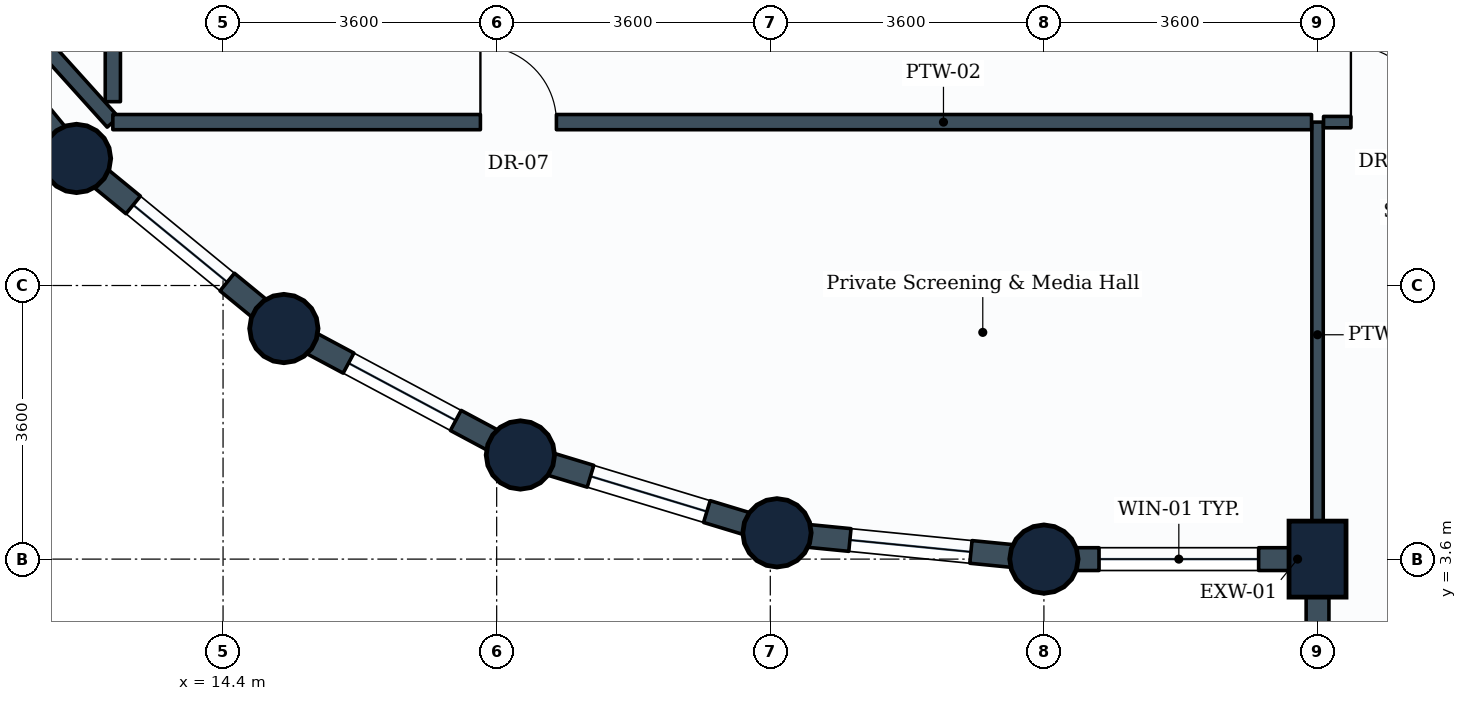
"""IFC4 building model, lengths in metres.
Left out: names, types, materials, properties, quantities, classifications, styles, units other than length and angle.
Written with IfcOpenShell. Run it as: python <this file> out.ifc"""

import sys

from ifc_helpers import new_model, si_unit, direction, frame, frame_2d, origin, origin_2d, place, context, subcontext, project, spatial, rectangle, circle, extrude, element, fill, save


model = new_model("IFC4")
c1 = context("Model", 3, precision=1e-05, world=origin(), true_north=direction((0.0, 1.0)))
c2 = subcontext(c1, "Body", "Model", "MODEL_VIEW")
j1 = project(units=[si_unit("LENGTHUNIT", "METRE"), si_unit("PLANEANGLEUNIT", "RADIAN")], contexts=[c1])
p1 = place(None, origin())
s1 = spatial("IfcSite", under=j1, at=p1, CompositionType="ELEMENT")
p2 = place(p1, origin())
s2 = spatial("IfcBuilding", under=s1, at=p2, CompositionType="ELEMENT")
p3 = place(p2, frame((0.0, 0.0, 139.0)))
s3 = spatial("IfcBuildingStorey", under=s2, at=p3, CompositionType="ELEMENT", Elevation=139.0)
for number, where, z_axis, x_axis in (
    (1, (12.472, 8.872, 0.0), (0.0, 0.0, 1.0), (1.0, 0.0, 0.0)),
    (2, (15.2, 6.634, 0.0), (0.0, 0.0, 1.0), (1.0, 0.0, 0.0)),
    (3, (18.312, 4.97, 0.0), (0.0, 0.0, 1.0), (1.0, 0.0, 0.0)),
    (4, (21.688, 3.946, 0.0), (0.0, 0.0, 1.0), (1.0, 0.0, 0.0)),
    (5, (25.2, 3.6, 0.0), (0.0, 0.0, 1.0), (1.0, 0.0, 0.0)),
):
    element("IfcColumn", number, at=place(p3, frame(where, z_axis=z_axis, x_axis=x_axis)), inside=s3, PredefinedType="COLUMN", context=c2, shape_type="SweptSolid", body=[
        extrude(circle(Radius=0.45, at=origin_2d()), origin(), (0.0, 0.0, 1.0), 3.8),
    ])
p4 = place(p3, frame((28.8, 3.6, 0.0), z_axis=(0.0, 0.0, 1.0), x_axis=(1.0, 0.0, 0.0)))
e6 = element("IfcColumn", 6, at=p4, inside=s3, PredefinedType="COLUMN", context=c2, shape_type="SweptSolid", body=[
    extrude(rectangle(XDim=0.75, YDim=1.0, at=origin_2d()), origin(), (0.0, 0.0, 1.0), 3.8),
])
p5 = place(p3, frame((28.8, 3.6, 0.0), z_axis=(0.0, 0.0, 1.0), x_axis=(-1.0, 0.0, 0.0)))
e7 = element("IfcWall", 7, at=p5, inside=s3, PredefinedType="STANDARD", context=c2, shape_type="SweptSolid", body=[
    extrude(rectangle(XDim=3.6, YDim=0.3, at=frame_2d((1.8, 0.0))), origin(), (0.0, 0.0, 1.0), 2.93),
])
p6 = place(p5, frame((0.775, 0.0, 0.85)))
e8 = element("IfcOpeningElement", 8, at=p6, cuts=e7, PredefinedType="OPENING", context=c2, shape_type="SweptSolid", body=[
    extrude(rectangle(XDim=2.1, YDim=1.35, at=frame_2d((1.05, 0.675))), frame((0.0, 0.16, 0.0), z_axis=(0.0, -1.0, 0.0), x_axis=(1.0, 0.0, 0.0)), (0.0, 0.0, 1.0), 0.32),
])
p7 = place(p3, frame((28.8, 3.6, 0.0), z_axis=(0.0, 0.0, 1.0), x_axis=(0.0, -1.0, 0.0)))
e9 = element("IfcWall", 9, at=p7, inside=s3, PredefinedType="STANDARD", context=c2, shape_type="SweptSolid", body=[
    extrude(rectangle(XDim=2.1, YDim=0.3, at=frame_2d((1.05, 0.0))), origin(), (0.0, 0.0, 1.0), 2.93),
])
p8 = place(p3, frame((12.472, 8.872, 0.0), z_axis=(0.0, 0.0, 1.0), x_axis=(-0.634258295121, 0.773121216285, 0.0)))
e10 = element("IfcWall", 10, at=p8, inside=s3, PredefinedType="STANDARD", context=c2, shape_type="SweptSolid", body=[
    extrude(rectangle(XDim=3.529, YDim=0.3, at=frame_2d((1.764, 0.0))), origin(), (0.0, 0.0, 1.0), 2.93),
])
p9 = place(p8, frame((0.964, 0.0, 0.85)))
e11 = element("IfcOpeningElement", 11, at=p9, cuts=e10, PredefinedType="OPENING", context=c2, shape_type="SweptSolid", body=[
    extrude(rectangle(XDim=1.6, YDim=1.35, at=frame_2d((0.8, 0.675))), frame((0.0, 0.16, 0.0), z_axis=(0.0, -1.0, 0.0), x_axis=(1.0, 0.0, 0.0)), (0.0, 0.0, 1.0), 0.32),
])
p10 = place(p3, frame((15.2, 6.634, 0.0), z_axis=(0.0, 0.0, 1.0), x_axis=(-0.773121216285, 0.634258295121, 0.0)))
e12 = element("IfcWall", 12, at=p10, inside=s3, PredefinedType="STANDARD", context=c2, shape_type="SweptSolid", body=[
    extrude(rectangle(XDim=3.529, YDim=0.3, at=frame_2d((1.764, 0.0))), origin(), (0.0, 0.0, 1.0), 2.93),
])
p11 = place(p10, frame((0.964, 0.0, 0.85)))
e13 = element("IfcOpeningElement", 13, at=p11, cuts=e12, PredefinedType="OPENING", context=c2, shape_type="SweptSolid", body=[
    extrude(rectangle(XDim=1.6, YDim=1.35, at=frame_2d((0.8, 0.675))), frame((0.0, 0.16, 0.0), z_axis=(0.0, -1.0, 0.0), x_axis=(1.0, 0.0, 0.0)), (0.0, 0.0, 1.0), 0.32),
])
p12 = place(p3, frame((18.312, 4.97, 0.0), z_axis=(0.0, 0.0, 1.0), x_axis=(-0.881846862014, 0.471535907389, 0.0)))
e14 = element("IfcWall", 14, at=p12, inside=s3, PredefinedType="STANDARD", context=c2, shape_type="SweptSolid", body=[
    extrude(rectangle(XDim=3.529, YDim=0.3, at=frame_2d((1.765, 0.0))), origin(), (0.0, 0.0, 1.0), 2.93),
])
p13 = place(p12, frame((0.964, 0.0, 0.85)))
e15 = element("IfcOpeningElement", 15, at=p13, cuts=e14, PredefinedType="OPENING", context=c2, shape_type="SweptSolid", body=[
    extrude(rectangle(XDim=1.6, YDim=1.35, at=frame_2d((0.8, 0.675))), frame((0.0, 0.16, 0.0), z_axis=(0.0, -1.0, 0.0), x_axis=(1.0, 0.0, 0.0)), (0.0, 0.0, 1.0), 0.32),
])
p14 = place(p3, frame((21.688, 3.946, 0.0), z_axis=(0.0, 0.0, 1.0), x_axis=(-0.956953367403, 0.290241714123, 0.0)))
e16 = element("IfcWall", 16, at=p14, inside=s3, PredefinedType="STANDARD", context=c2, shape_type="SweptSolid", body=[
    extrude(rectangle(XDim=3.528, YDim=0.3, at=frame_2d((1.764, 0.0))), origin(), (0.0, 0.0, 1.0), 2.93),
])
p15 = place(p14, frame((0.964, 0.0, 0.85)))
e17 = element("IfcOpeningElement", 17, at=p15, cuts=e16, PredefinedType="OPENING", context=c2, shape_type="SweptSolid", body=[
    extrude(rectangle(XDim=1.6, YDim=1.35, at=frame_2d((0.8, 0.675))), frame((0.0, 0.16, 0.0), z_axis=(0.0, -1.0, 0.0), x_axis=(1.0, 0.0, 0.0)), (0.0, 0.0, 1.0), 0.32),
])
p16 = place(p3, frame((25.2, 3.6, 0.0), z_axis=(0.0, 0.0, 1.0), x_axis=(-0.995183369056, 0.098030923459, 0.0)))
e18 = element("IfcWall", 18, at=p16, inside=s3, PredefinedType="STANDARD", context=c2, shape_type="SweptSolid", body=[
    extrude(rectangle(XDim=3.529, YDim=0.3, at=frame_2d((1.765, 0.0))), origin(), (0.0, 0.0, 1.0), 2.93),
])
p17 = place(p16, frame((0.965, 0.0, 0.85)))
e19 = element("IfcOpeningElement", 19, at=p17, cuts=e18, PredefinedType="OPENING", context=c2, shape_type="SweptSolid", body=[
    extrude(rectangle(XDim=1.6, YDim=1.35, at=frame_2d((0.8, 0.675))), frame((0.0, 0.16, 0.0), z_axis=(0.0, -1.0, 0.0), x_axis=(1.0, 0.0, 0.0)), (0.0, 0.0, 1.0), 0.32),
])
p18 = place(p3, frame((28.8, 9.35, 0.0), z_axis=(0.0, 0.0, 1.0), x_axis=(0.0, -1.0, 0.0)))
e20 = element("IfcWall", 20, at=p18, inside=s3, PredefinedType="PARTITIONING", context=c2, shape_type="SweptSolid", body=[
    extrude(rectangle(XDim=5.596, YDim=0.15, at=frame_2d((2.798, 0.0))), origin(), (0.0, 0.0, 1.0), 3.535),
])
p19 = place(p3, frame((12.95, 9.35, 0.0), z_axis=(0.0, 0.0, 1.0), x_axis=(-0.669422074366, 0.742882282971, 0.0)))
e21 = element("IfcWall", 21, at=p19, inside=s3, PredefinedType="PARTITIONING", context=c2, shape_type="SweptSolid", body=[
    extrude(rectangle(XDim=4.6, YDim=0.2, at=frame_2d((2.3, 0.0))), origin(), (0.0, 0.0, 1.0), 2.93),
])
p20 = place(p3, frame((12.95, 9.619, 0.0), z_axis=(0.0, 0.0, 1.0), x_axis=(0.0, 1.0, 0.0)))
e22 = element("IfcWall", 22, at=p20, inside=s3, PredefinedType="PARTITIONING", context=c2, shape_type="SweptSolid", body=[
    extrude(rectangle(XDim=6.877, YDim=0.2, at=frame_2d((3.438, 0.0))), origin(), (0.0, 0.0, 1.0), 3.17),
])
p21 = place(p20, frame((3.962, 0.0, 0.0)))
e23 = element("IfcOpeningElement", 23, at=p21, cuts=e22, PredefinedType="OPENING", context=c2, shape_type="SweptSolid", body=[
    extrude(rectangle(XDim=1.0, YDim=2.1, at=frame_2d((0.5, 1.05))), frame((0.0, 0.11, 0.0), z_axis=(0.0, -1.0, 0.0), x_axis=(1.0, 0.0, 0.0)), (0.0, 0.0, 1.0), 0.22),
])
p22 = place(p3, frame((12.95, 9.35, 0.0), z_axis=(0.0, 0.0, 1.0), x_axis=(1.0, 0.0, 0.0)))
e24 = element("IfcWall", 24, at=p22, inside=s3, PredefinedType="PARTITIONING", context=c2, shape_type="SweptSolid", body=[
    extrude(rectangle(XDim=15.771, YDim=0.2, at=frame_2d((7.885, 0.0))), origin(), (0.0, 0.0, 1.0), 3.17),
])
p23 = place(p22, frame((4.836, 0.0, 0.0)))
e25 = element("IfcOpeningElement", 25, at=p23, cuts=e24, PredefinedType="OPENING", context=c2, shape_type="SweptSolid", body=[
    extrude(rectangle(XDim=1.0, YDim=2.1, at=frame_2d((0.5, 1.05))), frame((0.0, 0.11, 0.0), z_axis=(0.0, -1.0, 0.0), x_axis=(1.0, 0.0, 0.0)), (0.0, 0.0, 1.0), 0.22),
])
p24 = place(p3, frame((28.879, 9.35, 0.0), z_axis=(0.0, 0.0, 1.0), x_axis=(1.0, 0.0, 0.0)))
e26 = element("IfcWall", 26, at=p24, inside=s3, PredefinedType="PARTITIONING", context=c2, shape_type="SweptSolid", body=[
    extrude(rectangle(XDim=5.521, YDim=0.15, at=frame_2d((2.76, 0.0))), origin(), (0.0, 0.0, 1.0), 3.535),
])
p25 = place(p24, frame((0.36, 0.0, 0.0)))
e27 = element("IfcOpeningElement", 27, at=p25, cuts=e26, PredefinedType="OPENING", context=c2, shape_type="SweptSolid", body=[
    extrude(rectangle(XDim=1.0, YDim=2.1, at=frame_2d((0.5, 1.05))), frame((0.0, 0.085, 0.0), z_axis=(0.0, -1.0, 0.0), x_axis=(1.0, 0.0, 0.0)), (0.0, 0.0, 1.0), 0.17),
])
p26 = place(p6, origin())
e28 = element("IfcWindow", 28, at=p26, inside=s3, PartitioningType="SINGLE_PANEL", PredefinedType="WINDOW", context=c2, shape_type="SweptSolid", body=[
    extrude(rectangle(XDim=2.1, YDim=1.35, at=frame_2d((1.05, 0.675))), frame((0.0, 0.03, 0.0), z_axis=(0.0, -1.0, 0.0), x_axis=(1.0, 0.0, 0.0)), (0.0, 0.0, 1.0), 0.06),
])
fill(e8, e28)
p27 = place(p11, origin())
e29 = element("IfcWindow", 29, at=p27, inside=s3, PartitioningType="SINGLE_PANEL", PredefinedType="WINDOW", context=c2, shape_type="SweptSolid", body=[
    extrude(rectangle(XDim=1.6, YDim=1.35, at=frame_2d((0.8, 0.675))), frame((0.0, 0.03, 0.0), z_axis=(0.0, -1.0, 0.0), x_axis=(1.0, 0.0, 0.0)), (0.0, 0.0, 1.0), 0.06),
])
fill(e13, e29)
p28 = place(p13, origin())
e30 = element("IfcWindow", 30, at=p28, inside=s3, PartitioningType="SINGLE_PANEL", PredefinedType="WINDOW", context=c2, shape_type="SweptSolid", body=[
    extrude(rectangle(XDim=1.6, YDim=1.35, at=frame_2d((0.8, 0.675))), frame((0.0, 0.03, 0.0), z_axis=(0.0, -1.0, 0.0), x_axis=(1.0, 0.0, 0.0)), (0.0, 0.0, 1.0), 0.06),
])
fill(e15, e30)
p29 = place(p15, origin())
e31 = element("IfcWindow", 31, at=p29, inside=s3, PartitioningType="SINGLE_PANEL", PredefinedType="WINDOW", context=c2, shape_type="SweptSolid", body=[
    extrude(rectangle(XDim=1.6, YDim=1.35, at=frame_2d((0.8, 0.675))), frame((0.0, 0.03, 0.0), z_axis=(0.0, -1.0, 0.0), x_axis=(1.0, 0.0, 0.0)), (0.0, 0.0, 1.0), 0.06),
])
fill(e17, e31)
p30 = place(p17, origin())
e32 = element("IfcWindow", 32, at=p30, inside=s3, PartitioningType="SINGLE_PANEL", PredefinedType="WINDOW", context=c2, shape_type="SweptSolid", body=[
    extrude(rectangle(XDim=1.6, YDim=1.35, at=frame_2d((0.8, 0.675))), frame((0.0, 0.03, 0.0), z_axis=(0.0, -1.0, 0.0), x_axis=(1.0, 0.0, 0.0)), (0.0, 0.0, 1.0), 0.06),
])
fill(e19, e32)
p31 = place(p23, origin())
e33 = element("IfcDoor", 33, at=p31, inside=s3, OperationType="SINGLE_SWING_LEFT", PredefinedType="DOOR", context=c2, shape_type="SweptSolid", body=[
    extrude(rectangle(XDim=1.0, YDim=2.1, at=frame_2d((0.5, 1.05))), frame((0.0, 0.025, 0.0), z_axis=(0.0, -1.0, 0.0), x_axis=(1.0, 0.0, 0.0)), (0.0, 0.0, 1.0), 0.05),
])
fill(e25, e33)
p32 = place(p25, origin())
e34 = element("IfcDoor", 34, at=p32, inside=s3, OperationType="SINGLE_SWING_LEFT", PredefinedType="DOOR", context=c2, shape_type="SweptSolid", body=[
    extrude(rectangle(XDim=1.0, YDim=2.1, at=frame_2d((0.5, 1.05))), frame((0.0, 0.025, 0.0), z_axis=(0.0, -1.0, 0.0), x_axis=(1.0, 0.0, 0.0)), (0.0, 0.0, 1.0), 0.05),
])
fill(e27, e34)
save(model, sys.argv[1])
